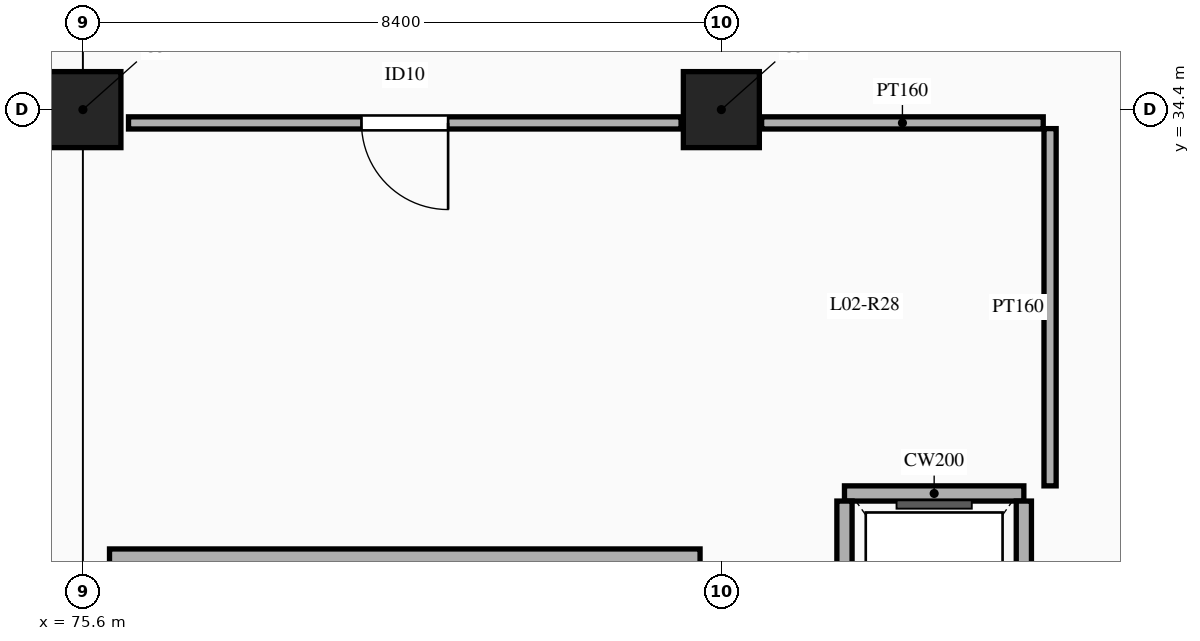
"""IFC4 building model, lengths in metres.
Left out: names, types, materials, properties, quantities, classifications, styles, units other than length and angle.
Written with IfcOpenShell. Run it as: python <this file> out.ifc"""

import sys

from ifc_helpers import new_model, si_unit, direction, frame, frame_2d, origin, origin_2d, place, context, subcontext, project, spatial, rectangle, extrude, element, fill, save


model = new_model("IFC4")
c1 = context("Model", 3, precision=1e-05, world=origin(), true_north=direction((0.0, 1.0)))
c2 = subcontext(c1, "Body", "Model", "MODEL_VIEW")
j1 = project(units=[si_unit("LENGTHUNIT", "METRE"), si_unit("PLANEANGLEUNIT", "RADIAN")], contexts=[c1])
p1 = place(None, origin())
s1 = spatial("IfcSite", under=j1, at=p1, CompositionType="ELEMENT")
p2 = place(p1, origin())
s2 = spatial("IfcBuilding", under=s1, at=p2, CompositionType="ELEMENT")
p3 = place(p2, frame((0.0, 0.0, 10.2)))
s3 = spatial("IfcBuildingStorey", under=s2, at=p3, CompositionType="ELEMENT", Elevation=10.2)
for number, where, z_axis, x_axis in (
    (1, (75.6, 34.4, 0.0), (0.0, 0.0, 1.0), (1.0, 0.0, 0.0)),
    (2, (84.0, 34.4, 0.0), (0.0, 0.0, 1.0), (1.0, 0.0, 0.0)),
):
    element("IfcColumn", number, at=place(p3, frame(where, z_axis=z_axis, x_axis=x_axis)), inside=s3, PredefinedType="COLUMN", context=c2, shape_type="SweptSolid", body=[
        extrude(rectangle(XDim=1.0, YDim=1.0, at=origin_2d()), origin(), (0.0, 0.0, 1.0), 4.8),
    ])
p4 = place(p3, frame((75.95, 28.52, 0.0), z_axis=(0.0, 0.0, 1.0), x_axis=(1.0, 0.0, 0.0)))
e3 = element("IfcWall", 3, at=p4, inside=s3, PredefinedType="SOLIDWALL", context=c2, shape_type="SweptSolid", body=[
    extrude(rectangle(XDim=7.77, YDim=0.2, at=frame_2d((3.885, 0.0))), origin(), (0.0, 0.0, 1.0), 4.55),
])
p5 = place(p3, frame((85.62, 29.35, 0.0), z_axis=(0.0, 0.0, 1.0), x_axis=(1.0, 0.0, 0.0)))
e4 = element("IfcWall", 4, at=p5, inside=s3, PredefinedType="SOLIDWALL", context=c2, shape_type="SweptSolid", body=[
    extrude(rectangle(XDim=2.36, YDim=0.2, at=frame_2d((1.18, 0.0))), origin(), (0.0, 0.0, 1.0), 4.55),
])
p6 = place(p3, frame((85.62, 26.35, 0.0), z_axis=(0.0, 0.0, 1.0), x_axis=(0.0, 1.0, 0.0)))
e5 = element("IfcWall", 5, at=p6, inside=s3, PredefinedType="SOLIDWALL", context=c2, shape_type="SweptSolid", body=[
    extrude(rectangle(XDim=2.9, YDim=0.2, at=frame_2d((1.45, 0.0))), origin(), (0.0, 0.0, 1.0), 4.55),
])
p7 = place(p3, frame((87.98, 26.35, 0.0), z_axis=(0.0, 0.0, 1.0), x_axis=(0.0, 1.0, 0.0)))
e6 = element("IfcWall", 6, at=p7, inside=s3, PredefinedType="SOLIDWALL", context=c2, shape_type="SweptSolid", body=[
    extrude(rectangle(XDim=2.9, YDim=0.2, at=frame_2d((1.45, 0.0))), origin(), (0.0, 0.0, 1.0), 4.23),
])
p8 = place(p3, frame((88.325, 29.45, 0.0), z_axis=(0.0, 0.0, 1.0), x_axis=(0.0, 1.0, 0.0)))
e7 = element("IfcWall", 7, at=p8, inside=s3, PredefinedType="PARTITIONING", context=c2, shape_type="SweptSolid", body=[
    extrude(rectangle(XDim=4.7, YDim=0.16, at=frame_2d((2.35, 0.0))), origin(), (0.0, 0.0, 1.0), 3.75),
])
p9 = place(p3, frame((76.2, 34.225, 0.0), z_axis=(0.0, 0.0, 1.0), x_axis=(1.0, 0.0, 0.0)))
e8 = element("IfcWall", 8, at=p9, inside=s3, PredefinedType="PARTITIONING", context=c2, shape_type="SweptSolid", body=[
    extrude(rectangle(XDim=7.27, YDim=0.16, at=frame_2d((3.635, 0.0))), origin(), (0.0, 0.0, 1.0), 3.75),
])
p10 = place(p9, frame((3.065, 0.0, 0.0)))
e9 = element("IfcOpeningElement", 9, at=p10, cuts=e8, PredefinedType="OPENING", context=c2, shape_type="SweptSolid", body=[
    extrude(rectangle(XDim=1.14, YDim=2.22, at=frame_2d((0.57, 1.11))), frame((0.0, 0.09, 0.0), z_axis=(0.0, -1.0, 0.0), x_axis=(1.0, 0.0, 0.0)), (0.0, 0.0, 1.0), 0.18),
])
p11 = place(p3, frame((84.53, 34.225, 0.0), z_axis=(0.0, 0.0, 1.0), x_axis=(1.0, 0.0, 0.0)))
e10 = element("IfcWall", 10, at=p11, inside=s3, PredefinedType="PARTITIONING", context=c2, shape_type="SweptSolid", body=[
    extrude(rectangle(XDim=3.705, YDim=0.16, at=frame_2d((1.853, 0.0))), origin(), (0.0, 0.0, 1.0), 3.75),
])
p12 = place(p10, frame((1.14, 0.0, 0.0), z_axis=(0.0, 0.0, 1.0), x_axis=(-1.0, 0.0, 0.0)))
e11 = element("IfcDoor", 11, at=p12, inside=s3, OperationType="SINGLE_SWING_LEFT", PredefinedType="DOOR", context=c2, shape_type="SweptSolid", body=[
    extrude(rectangle(XDim=1.14, YDim=2.22, at=frame_2d((0.57, 1.11))), frame((0.0, 0.025, 0.0), z_axis=(0.0, -1.0, 0.0), x_axis=(1.0, 0.0, 0.0)), (0.0, 0.0, 1.0), 0.05),
])
fill(e9, e11)
save(model, sys.argv[1])
